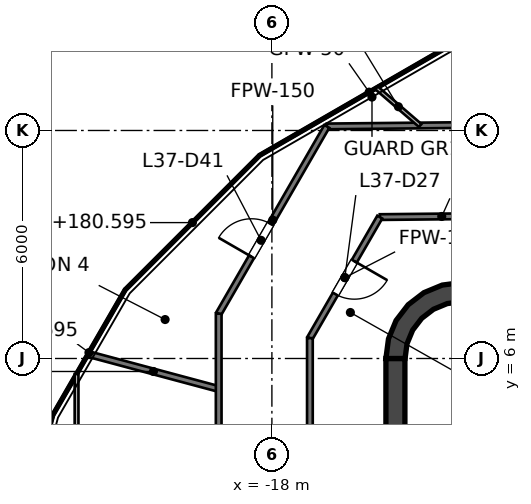
"""IFC4 building model, lengths in metres.
Left out: names, types, materials, properties, quantities, classifications, styles, units other than length and angle.
Written with IfcOpenShell. Run it as: python <this file> out.ifc"""

import sys

from ifc_helpers import new_model, si_unit, direction, frame, frame_2d, origin, place, context, subcontext, project, spatial, polyline, rectangle, outline, extrude, element, fill, save


model = new_model("IFC4")
c1 = context("Model", 3, precision=1e-05, world=origin(), true_north=direction((0.0, 1.0)))
c2 = subcontext(c1, "Body", "Model", "MODEL_VIEW")
j1 = project(units=[si_unit("LENGTHUNIT", "METRE"), si_unit("PLANEANGLEUNIT", "RADIAN")], contexts=[c1])
p1 = place(None, origin())
s1 = spatial("IfcSite", under=j1, at=p1, CompositionType="ELEMENT")
p2 = place(p1, origin())
s2 = spatial("IfcBuilding", under=s1, at=p2, CompositionType="ELEMENT")
p3 = place(p2, frame((0.0, 0.0, 177.6)))
s3 = spatial("IfcBuildingStorey", under=s2, at=p3, CompositionType="ELEMENT", Elevation=177.6)
p4 = place(p3, frame((-14.75, -6.0, 0.0), z_axis=(0.0, 0.0, 1.0), x_axis=(0.0, 1.0, 0.0)))
e1 = element("IfcWall", 1, at=p4, inside=s3, PredefinedType="SHEAR", context=c2, shape_type="SweptSolid", body=[
    extrude(rectangle(XDim=12.0, YDim=0.5, at=frame_2d((6.0, 0.0))), origin(), (0.0, 0.0, 1.0), 4.0),
])
p5 = place(p3, origin())
e2 = element("IfcWall", 2, at=p5, inside=s3, PredefinedType="SHEAR", context=c2, shape_type="SweptSolid", body=[
    extrude(outline(polyline([(-15.0, 6.0), (-14.496, 6.0), (-14.445, 6.387), (-14.295, 6.748), (-14.058, 7.058), (-13.748, 7.295), (-13.387, 7.445), (-13.0, 7.496), (-13.0, 8.0), (-13.518, 7.932), (-14.0, 7.732), (-14.414, 7.414), (-14.732, 7.0), (-14.932, 6.518), (-15.0, 6.0)])), origin(), (0.0, 0.0, 1.0), 4.0),
])
e3 = element("IfcWall", 3, at=p5, inside=s3, PredefinedType="SOLIDWALL", context=c2, shape_type="SweptSolid", body=[
    extrude(outline(polyline([(-12.0, -5.925), (-12.0, -5.675), (-14.25, -5.675), (-14.25, -3.025), (-12.0, -3.025), (-12.0, -2.775), (-14.25, -2.775), (-14.25, -0.125), (-12.0, -0.125), (-12.0, 0.125), (-14.25, 0.125), (-14.25, 2.775), (-12.0, 2.775), (-12.0, 3.025), (-14.25, 3.025), (-14.25, 5.675), (-12.0, 5.675), (-12.0, 5.925), (-14.25, 5.925), (-14.5, 5.925), (-14.5, 5.675), (-14.5, 3.025), (-14.5, 2.775), (-14.5, 0.125), (-14.5, -0.125), (-14.5, -2.775), (-14.5, -3.025), (-14.5, -5.675), (-14.5, -5.925), (-14.25, -5.925), (-12.0, -5.925)])), origin(), (0.0, 0.0, 1.0), 3.85),
])
p6 = place(p3, frame((-22.835, 6.118, 0.0), z_axis=(0.0, 0.0, 1.0), x_axis=(0.965960919092, -0.258688041446, 0.0)))
e4 = element("IfcWall", 4, at=p6, inside=s3, PredefinedType="PARTITIONING", context=c2, shape_type="SweptSolid", body=[
    extrude(rectangle(XDim=3.556, YDim=0.15, at=frame_2d((1.778, 0.0))), origin(), (0.0, 0.0, 1.0), 3.85),
])
p7 = place(p3, frame((-15.161, 9.721, 0.0), z_axis=(0.0, 0.0, 1.0), x_axis=(0.999950429518, 0.009956832157, 0.0)))
e5 = element("IfcWall", 5, at=p7, inside=s3, PredefinedType="PARTITIONING", context=c2, shape_type="SweptSolid", body=[
    extrude(rectangle(XDim=3.261, YDim=0.15, at=frame_2d((1.631, 0.0))), origin(), (0.0, 0.0, 1.0), 2.995),
])
p8 = place(p3, frame((-16.555, 12.107, 0.0), z_axis=(0.0, 0.0, 1.0), x_axis=(0.999951034758, 0.009895862121, 0.0)))
e6 = element("IfcWall", 6, at=p8, inside=s3, PredefinedType="PARTITIONING", context=c2, shape_type="SweptSolid", body=[
    extrude(rectangle(XDim=30.715, YDim=0.15, at=frame_2d((15.358, 0.0))), origin(), (0.0, 0.0, 1.0), 2.927),
])
p9 = place(p8, frame((20.689, 0.0, 0.0)))
e7 = element("IfcOpeningElement", 7, at=p9, cuts=e6, PredefinedType="OPENING", context=c2, shape_type="SweptSolid", body=[
    extrude(rectangle(XDim=1.0, YDim=2.1, at=frame_2d((0.5, 1.05))), frame((0.0, 0.075, 0.0), z_axis=(0.0, -1.0, 0.0), x_axis=(1.0, 0.0, 0.0)), (0.0, 0.0, 1.0), 0.15),
])
p10 = place(p8, frame((14.115, 0.0, 0.0)))
e8 = element("IfcOpeningElement", 8, at=p10, cuts=e6, PredefinedType="OPENING", context=c2, shape_type="SweptSolid", body=[
    extrude(rectangle(XDim=1.0, YDim=2.1, at=frame_2d((0.5, 1.05))), frame((0.0, 0.075, 0.0), z_axis=(0.0, -1.0, 0.0), x_axis=(1.0, 0.0, 0.0)), (0.0, 0.0, 1.0), 0.15),
])
p11 = place(p8, frame((10.638, 0.0, 0.0)))
e9 = element("IfcOpeningElement", 9, at=p11, cuts=e6, PredefinedType="OPENING", context=c2, shape_type="SweptSolid", body=[
    extrude(rectangle(XDim=1.0, YDim=2.1, at=frame_2d((0.5, 1.05))), frame((0.0, 0.075, 0.0), z_axis=(0.0, -1.0, 0.0), x_axis=(1.0, 0.0, 0.0)), (0.0, 0.0, 1.0), 0.15),
])
p12 = place(p8, frame((5.176, 0.0, 0.0)))
e10 = element("IfcOpeningElement", 10, at=p12, cuts=e6, PredefinedType="OPENING", context=c2, shape_type="SweptSolid", body=[
    extrude(rectangle(XDim=1.0, YDim=2.1, at=frame_2d((0.5, 1.05))), frame((0.0, 0.075, 0.0), z_axis=(0.0, -1.0, 0.0), x_axis=(1.0, 0.0, 0.0)), (0.0, 0.0, 1.0), 0.15),
])
p13 = place(p3, frame((-17.0, 6.536, 0.0), z_axis=(0.0, 0.0, 1.0), x_axis=(0.499965700209, 0.866045205872, 0.0)))
e11 = element("IfcWall", 11, at=p13, inside=s3, PredefinedType="PARTITIONING", context=c2, shape_type="SweptSolid", body=[
    extrude(rectangle(XDim=3.678, YDim=0.15, at=frame_2d((1.839, 0.0))), origin(), (0.0, 0.0, 1.0), 2.995),
])
p14 = place(p13, frame((1.338, 0.0, 0.0)))
e12 = element("IfcOpeningElement", 12, at=p14, cuts=e11, PredefinedType="OPENING", context=c2, shape_type="SweptSolid", body=[
    extrude(rectangle(XDim=1.0, YDim=2.1, at=frame_2d((0.5, 1.05))), frame((0.0, 0.075, 0.0), z_axis=(0.0, -1.0, 0.0), x_axis=(1.0, 0.0, 0.0)), (0.0, 0.0, 1.0), 0.15),
])
p15 = place(p3, frame((-19.4, 7.179, 0.0), z_axis=(0.0, 0.0, 1.0), x_axis=(0.499973768087, 0.866040548257, 0.0)))
e13 = element("IfcWall", 13, at=p15, inside=s3, PredefinedType="PARTITIONING", context=c2, shape_type="SweptSolid", body=[
    extrude(rectangle(XDim=5.69, YDim=0.15, at=frame_2d((2.845, 0.0))), origin(), (0.0, 0.0, 1.0), 2.995),
])
p16 = place(p15, frame((1.73, 0.0, 0.0)))
e14 = element("IfcOpeningElement", 14, at=p16, cuts=e13, PredefinedType="OPENING", context=c2, shape_type="SweptSolid", body=[
    extrude(rectangle(XDim=1.0, YDim=2.1, at=frame_2d((0.5, 1.05))), frame((0.0, 0.075, 0.0), z_axis=(0.0, -1.0, 0.0), x_axis=(1.0, 0.0, 0.0)), (0.0, 0.0, 1.0), 0.15),
])
p17 = place(p3, frame((-17.0, -6.398, 0.0), z_axis=(0.0, 0.0, 1.0), x_axis=(0.0, 1.0, 0.0)))
e15 = element("IfcWall", 15, at=p17, inside=s3, PredefinedType="PARTITIONING", context=c2, shape_type="SweptSolid", body=[
    extrude(rectangle(XDim=12.934, YDim=0.15, at=frame_2d((6.467, 0.0))), origin(), (0.0, 0.0, 1.0), 2.927),
])
p18 = place(p17, frame((5.742, 0.0, 0.0)))
e16 = element("IfcOpeningElement", 16, at=p18, cuts=e15, PredefinedType="OPENING", context=c2, shape_type="SweptSolid", body=[
    extrude(rectangle(XDim=1.0, YDim=2.1, at=frame_2d((0.5, 1.05))), frame((0.0, 0.075, 0.0), z_axis=(0.0, -1.0, 0.0), x_axis=(1.0, 0.0, 0.0)), (0.0, 0.0, 1.0), 0.15),
])
p19 = place(p3, frame((-19.4, -6.876, 0.0), z_axis=(0.0, 0.0, 1.0), x_axis=(0.0, 1.0, 0.0)))
e17 = element("IfcWall", 17, at=p19, inside=s3, PredefinedType="PARTITIONING", context=c2, shape_type="SweptSolid", body=[
    extrude(rectangle(XDim=14.055, YDim=0.15, at=frame_2d((7.027, 0.0))), origin(), (0.0, 0.0, 1.0), 2.927),
])
p20 = place(p19, frame((9.338, 0.0, 0.0)))
e18 = element("IfcOpeningElement", 18, at=p20, cuts=e17, PredefinedType="OPENING", context=c2, shape_type="SweptSolid", body=[
    extrude(rectangle(XDim=1.0, YDim=2.1, at=frame_2d((0.5, 1.05))), frame((0.0, 0.075, 0.0), z_axis=(0.0, -1.0, 0.0), x_axis=(1.0, 0.0, 0.0)), (0.0, 0.0, 1.0), 0.15),
])
p21 = place(p19, frame((4.851, 0.0, 0.0)))
e19 = element("IfcOpeningElement", 19, at=p21, cuts=e17, PredefinedType="OPENING", context=c2, shape_type="SweptSolid", body=[
    extrude(rectangle(XDim=1.0, YDim=2.1, at=frame_2d((0.5, 1.05))), frame((0.0, 0.075, 0.0), z_axis=(0.0, -1.0, 0.0), x_axis=(1.0, 0.0, 0.0)), (0.0, 0.0, 1.0), 0.15),
])
p22 = place(p3, frame((-18.323, 11.345, 0.0), z_axis=(0.0, 0.0, 1.0), x_axis=(0.866004159061, 0.500036795134, 0.0)))
e20 = element("IfcWall", 20, at=p22, inside=s3, PredefinedType="PARTITIONING", context=c2, shape_type="SweptSolid", body=[
    extrude(rectangle(XDim=6.656, YDim=0.05, at=frame_2d((3.328, 0.0))), origin(), (0.0, 0.0, 1.0), 2.927),
])
p23 = place(p3, frame((-21.86, 7.807, 0.0), z_axis=(0.0, 0.0, 1.0), x_axis=(0.707009175172, 0.70720437373, 0.0)))
e21 = element("IfcWall", 21, at=p23, inside=s3, PredefinedType="PARTITIONING", context=c2, shape_type="SweptSolid", body=[
    extrude(rectangle(XDim=5.003, YDim=0.05, at=frame_2d((2.501, 0.0))), origin(), (0.0, 0.0, 1.0), 2.995),
])
p24 = place(p3, frame((-23.768, 4.504, 0.0), z_axis=(0.0, 0.0, 1.0), x_axis=(0.500289326849, 0.865858296398, 0.0)))
e22 = element("IfcWall", 22, at=p24, inside=s3, PredefinedType="PARTITIONING", context=c2, shape_type="SweptSolid", body=[
    extrude(rectangle(XDim=3.815, YDim=0.05, at=frame_2d((1.907, 0.0))), origin(), (0.0, 0.0, 1.0), 2.995),
])
p25 = place(p3, frame((-24.484, 1.829, 0.0), z_axis=(0.0, 0.0, 1.0), x_axis=(0.258518653834, 0.966006265828, 0.0)))
e23 = element("IfcWall", 23, at=p25, inside=s3, PredefinedType="PARTITIONING", context=c2, shape_type="SweptSolid", body=[
    extrude(rectangle(XDim=2.769, YDim=0.05, at=frame_2d((1.385, 0.0))), origin(), (0.0, 0.0, 1.0), 2.927),
])
p26 = place(p3, frame((-15.247, 13.121, 0.0), z_axis=(0.0, 0.0, 1.0), x_axis=(0.757903577164, -0.65236658998, 0.0)))
e24 = element("IfcWall", 24, at=p26, inside=s3, PredefinedType="PARTITIONING", context=c2, shape_type="SweptSolid", body=[
    extrude(rectangle(XDim=1.518, YDim=0.1, at=frame_2d((0.759, 0.0))), origin(), (0.0, 0.0, 1.0), 3.85),
])
p27 = place(p3, frame((-23.14, -7.621, 0.0), z_axis=(0.0, 0.0, 1.0), x_axis=(0.0, 1.0, 0.0)))
e25 = element("IfcWall", 25, at=p27, inside=s3, PredefinedType="PARTITIONING", context=c2, shape_type="SweptSolid", body=[
    extrude(rectangle(XDim=13.211, YDim=0.1, at=frame_2d((6.605, 0.0))), origin(), (0.0, 0.0, 1.0), 2.927),
])
p28 = place(p14, origin())
e26 = element("IfcDoor", 26, at=p28, inside=s3, OperationType="SINGLE_SWING_RIGHT", PredefinedType="DOOR", context=c2, shape_type="SweptSolid", body=[
    extrude(rectangle(XDim=1.0, YDim=2.1, at=frame_2d((0.5, 1.05))), frame((0.0, 0.025, 0.0), z_axis=(0.0, -1.0, 0.0), x_axis=(1.0, 0.0, 0.0)), (0.0, 0.0, 1.0), 0.05),
])
fill(e12, e26)
p29 = place(p16, origin())
e27 = element("IfcDoor", 27, at=p29, inside=s3, OperationType="SINGLE_SWING_LEFT", PredefinedType="DOOR", context=c2, shape_type="SweptSolid", body=[
    extrude(rectangle(XDim=1.0, YDim=2.1, at=frame_2d((0.5, 1.05))), frame((0.0, 0.025, 0.0), z_axis=(0.0, -1.0, 0.0), x_axis=(1.0, 0.0, 0.0)), (0.0, 0.0, 1.0), 0.05),
])
fill(e14, e27)
save(model, sys.argv[1])
